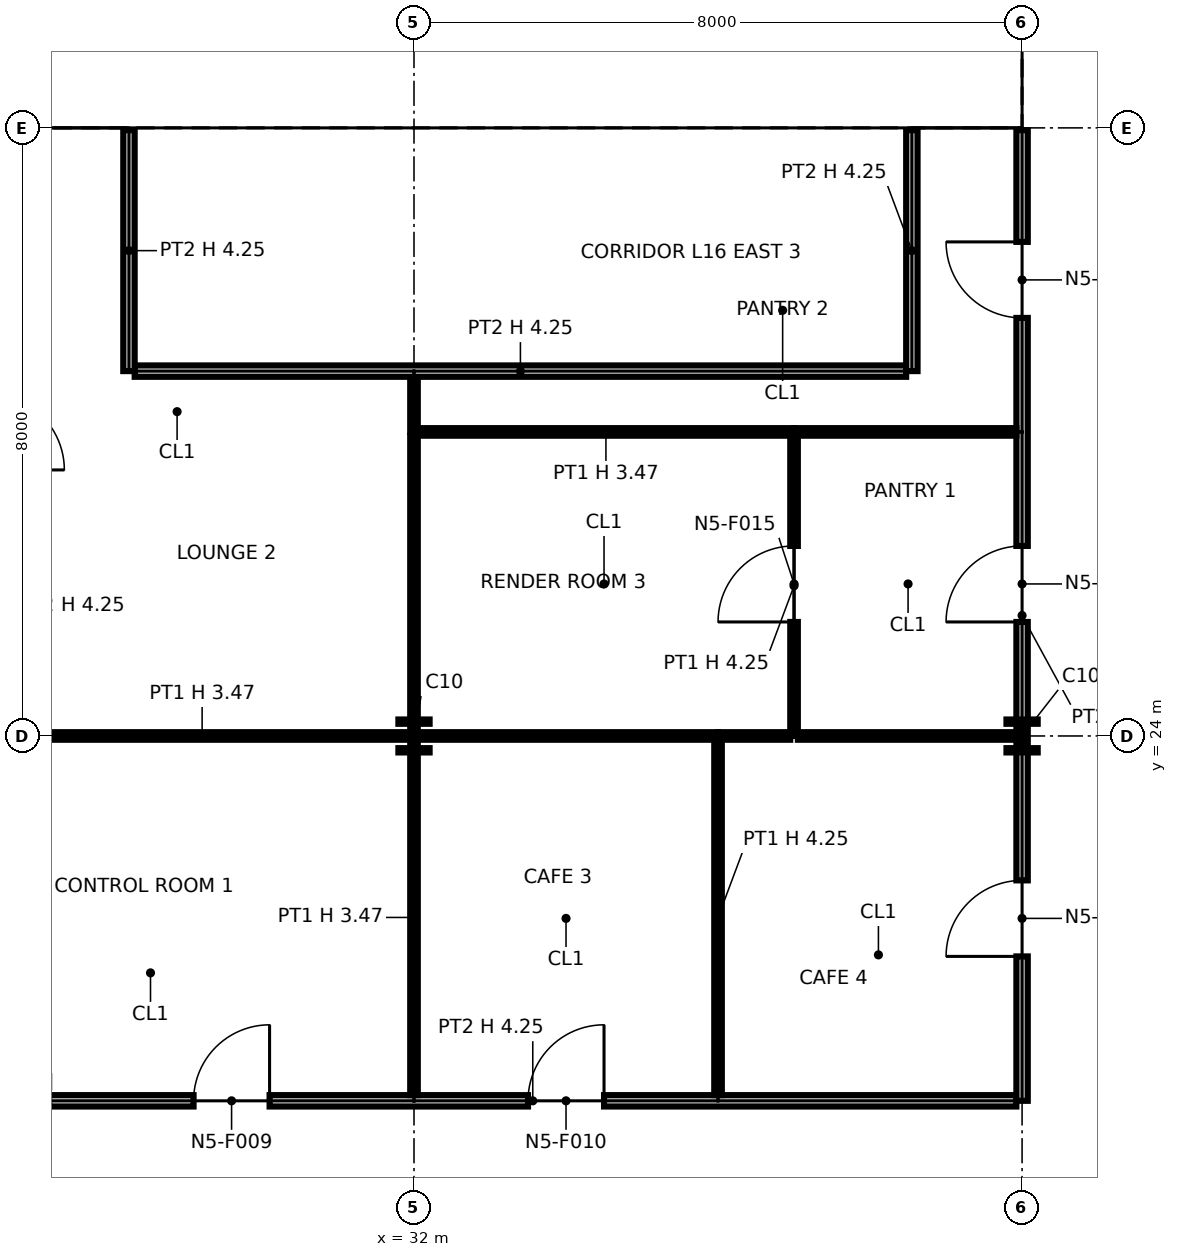
"""IFC4 building model, lengths in metres.
Left out: names, types, materials, properties, quantities, classifications, styles, units other than length and angle.
Written with IfcOpenShell. Run it as: python <this file> out.ifc"""

import sys

from ifc_helpers import new_model, si_unit, direction, frame, frame_2d, origin, origin_2d, place, context, subcontext, project, spatial, polyline, rectangle, i_section, outline, extrude, element, fill, save


model = new_model("IFC4")
c1 = context("Model", 3, precision=1e-05, world=origin(), true_north=direction((0.0, 1.0)))
c2 = subcontext(c1, "Body", "Model", "MODEL_VIEW")
j1 = project(units=[si_unit("LENGTHUNIT", "METRE"), si_unit("PLANEANGLEUNIT", "RADIAN")], contexts=[c1])
p1 = place(None, origin())
s1 = spatial("IfcSite", under=j1, at=p1, CompositionType="ELEMENT")
p2 = place(p1, origin())
s2 = spatial("IfcBuilding", under=s1, at=p2, CompositionType="ELEMENT")
p3 = place(p2, frame((0.0, 0.0, 87.6)))
s3 = spatial("IfcBuildingStorey", under=s2, at=p3, CompositionType="ELEMENT", Elevation=87.6)
p4 = place(p3, frame((32.0, 24.0, 0.0), z_axis=(0.0, 0.0, 1.0), x_axis=(1.0, 0.0, 0.0)))
e1 = element("IfcColumn", 1, at=p4, inside=s3, PredefinedType="COLUMN", context=c2, shape_type="SweptSolid", body=[
    extrude(i_section(OverallWidth=0.411, OverallDepth=0.434, WebThickness=0.036, FlangeThickness=0.057, at=origin_2d()), origin(), (0.0, 0.0, 1.0), 4.25),
])
p5 = place(p3, frame((32.0, 32.0, 0.0), z_axis=(0.0, 0.0, 1.0), x_axis=(1.0, 0.0, 0.0)))
e2 = element("IfcColumn", 2, at=p5, inside=s3, PredefinedType="COLUMN", context=c2, shape_type="SweptSolid", body=[
    extrude(i_section(OverallWidth=0.257, OverallDepth=0.363, WebThickness=0.013, FlangeThickness=0.022, at=origin_2d()), origin(), (0.0, 0.0, 1.0), 4.25),
])
p6 = place(p3, frame((40.0, 24.0, 0.0), z_axis=(0.0, 0.0, 1.0), x_axis=(1.0, 0.0, 0.0)))
e3 = element("IfcColumn", 3, at=p6, inside=s3, PredefinedType="COLUMN", context=c2, shape_type="SweptSolid", body=[
    extrude(i_section(OverallWidth=0.411, OverallDepth=0.434, WebThickness=0.036, FlangeThickness=0.057, at=origin_2d()), origin(), (0.0, 0.0, 1.0), 4.25),
])
p7 = place(p3, frame((40.0, 32.0, 0.0), z_axis=(0.0, 0.0, 1.0), x_axis=(1.0, 0.0, 0.0)))
e4 = element("IfcColumn", 4, at=p7, inside=s3, PredefinedType="COLUMN", context=c2, shape_type="SweptSolid", body=[
    extrude(i_section(OverallWidth=0.257, OverallDepth=0.363, WebThickness=0.013, FlangeThickness=0.022, at=origin_2d()), origin(), (0.0, 0.0, 1.0), 4.25),
])
p8 = place(p3, frame((24.65, 32.75, 0.0), z_axis=(0.0, 0.0, 1.0), x_axis=(1.0, 0.0, 0.0)))
e5 = element("IfcWall", 5, at=p8, inside=s3, PredefinedType="PARTITIONING", context=c2, shape_type="SweptSolid", body=[
    extrude(outline(polyline([(0.0, 0.0), (14.7, 0.0), (14.7, 4.25), (7.469, 4.25), (7.469, 3.632), (7.231, 3.632), (7.23, 4.25), (0.0, 4.25), (0.0, 0.0)])), frame((0.0, 0.1, 0.0), z_axis=(0.0, -1.0, 0.0), x_axis=(1.0, 0.0, 0.0)), (0.0, 0.0, 1.0), 0.2),
])
p9 = place(p8, frame((4.1, 0.0, 0.0)))
e6 = element("IfcOpeningElement", 6, at=p9, cuts=e5, PredefinedType="OPENING", context=c2, shape_type="SweptSolid", body=[
    extrude(rectangle(XDim=1.8, YDim=2.1, at=frame_2d((0.9, 1.05))), frame((0.0, 0.11, 0.0), z_axis=(0.0, -1.0, 0.0), x_axis=(1.0, 0.0, 0.0)), (0.0, 0.0, 1.0), 0.22),
])
p10 = place(p8, frame((8.55, 0.0, 0.0)))
e7 = element("IfcOpeningElement", 7, at=p10, cuts=e5, PredefinedType="OPENING", context=c2, shape_type="SweptSolid", body=[
    extrude(rectangle(XDim=1.4, YDim=2.1, at=frame_2d((0.7, 1.05))), frame((0.0, 0.11, 0.0), z_axis=(0.0, -1.0, 0.0), x_axis=(1.0, 0.0, 0.0)), (0.0, 0.0, 1.0), 0.22),
])
p11 = place(p8, frame((12.0, 0.0, 0.0)))
e8 = element("IfcOpeningElement", 8, at=p11, cuts=e5, PredefinedType="OPENING", context=c2, shape_type="SweptSolid", body=[
    extrude(rectangle(XDim=1.4, YDim=2.1, at=frame_2d((0.7, 1.05))), frame((0.0, 0.11, 0.0), z_axis=(0.0, -1.0, 0.0), x_axis=(1.0, 0.0, 0.0)), (0.0, 0.0, 1.0), 0.22),
])
p12 = place(p3, frame((30.025, 32.85, 0.0), z_axis=(0.0, 0.0, 1.0), x_axis=(0.0, 1.0, 0.0)))
e9 = element("IfcWall", 9, at=p12, inside=s3, PredefinedType="PARTITIONING", context=c2, shape_type="SweptSolid", body=[
    extrude(rectangle(XDim=2.0, YDim=0.15, at=frame_2d((1.0, 0.0))), origin(), (0.0, 0.0, 1.0), 4.25),
])
p13 = place(p12, frame((1.45, 0.0, 0.0), z_axis=(0.0, 0.0, 1.0), x_axis=(-1.0, 0.0, 0.0)))
e10 = element("IfcOpeningElement", 10, at=p13, cuts=e9, PredefinedType="OPENING", context=c2, shape_type="SweptSolid", body=[
    extrude(rectangle(XDim=0.7, YDim=2.1, at=frame_2d((0.35, 1.05))), frame((0.0, 0.085, 0.0), z_axis=(0.0, -1.0, 0.0), x_axis=(1.0, 0.0, 0.0)), (0.0, 0.0, 1.0), 0.17),
])
p14 = place(p3, frame((31.95, 32.85, 0.0), z_axis=(0.0, 0.0, 1.0), x_axis=(0.0, 1.0, 0.0)))
e11 = element("IfcWall", 11, at=p14, inside=s3, PredefinedType="PARTITIONING", context=c2, shape_type="SweptSolid", body=[
    extrude(rectangle(XDim=2.05, YDim=0.7, at=frame_2d((1.025, 0.0))), origin(), (0.0, 0.0, 1.0), 3.632),
])
for number, where, z_axis, x_axis in (
    (12, (35.6, 32.85, 0.0), (0.0, 0.0, 1.0), (0.0, 1.0, 0.0)),
    (13, (39.25, 32.85, 0.0), (0.0, 0.0, 1.0), (0.0, 1.0, 0.0)),
):
    element("IfcWall", number, at=place(p3, frame(where, z_axis=z_axis, x_axis=x_axis)), inside=s3, PredefinedType="PARTITIONING", context=c2, shape_type="SweptSolid", body=[
        extrude(rectangle(XDim=6.3, YDim=0.2, at=frame_2d((3.15, 0.0))), origin(), (0.0, 0.0, 1.0), 4.25),
    ])
p15 = place(p3, frame((27.2, 19.2, 0.0), z_axis=(0.0, 0.0, 1.0), x_axis=(1.0, 0.0, 0.0)))
e14 = element("IfcWall", 14, at=p15, inside=s3, PredefinedType="PARTITIONING", context=c2, shape_type="SweptSolid", body=[
    extrude(rectangle(XDim=12.725, YDim=0.15, at=frame_2d((6.363, 0.0))), origin(), (0.0, 0.0, 1.0), 4.25),
])
p16 = place(p15, frame((1.9, 0.0, 0.0)))
e15 = element("IfcOpeningElement", 15, at=p16, cuts=e14, PredefinedType="OPENING", context=c2, shape_type="SweptSolid", body=[
    extrude(rectangle(XDim=1.0, YDim=2.1, at=frame_2d((0.5, 1.05))), frame((0.0, 0.085, 0.0), z_axis=(0.0, -1.0, 0.0), x_axis=(1.0, 0.0, 0.0)), (0.0, 0.0, 1.0), 0.17),
])
p17 = place(p15, frame((6.3, 0.0, 0.0)))
e16 = element("IfcOpeningElement", 16, at=p17, cuts=e14, PredefinedType="OPENING", context=c2, shape_type="SweptSolid", body=[
    extrude(rectangle(XDim=1.0, YDim=2.1, at=frame_2d((0.5, 1.05))), frame((0.0, 0.085, 0.0), z_axis=(0.0, -1.0, 0.0), x_axis=(1.0, 0.0, 0.0)), (0.0, 0.0, 1.0), 0.17),
])
p18 = place(p3, frame((32.0, 19.275, 0.0), z_axis=(0.0, 0.0, 1.0), x_axis=(0.0, 1.0, 0.0)))
e17 = element("IfcWall", 17, at=p18, inside=s3, PredefinedType="PARTITIONING", context=c2, shape_type="SweptSolid", body=[
    extrude(rectangle(XDim=4.675, YDim=0.1, at=frame_2d((2.337, 0.0))), origin(), (0.0, 0.0, 1.0), 3.47),
])
p19 = place(p3, frame((36.0, 19.275, 0.0), z_axis=(0.0, 0.0, 1.0), x_axis=(0.0, 1.0, 0.0)))
e18 = element("IfcWall", 18, at=p19, inside=s3, PredefinedType="PARTITIONING", context=c2, shape_type="SweptSolid", body=[
    extrude(outline(polyline([(0.0, 0.0), (4.675, 0.0), (4.675, 4.25), (1.025, 4.25), (1.023, 3.47), (0.427, 3.47), (0.425, 4.25), (0.0, 4.25), (0.0, 0.0)])), frame((0.0, 0.05, 0.0), z_axis=(0.0, -1.0, 0.0), x_axis=(1.0, 0.0, 0.0)), (0.0, 0.0, 1.0), 0.1),
])
p20 = place(p3, frame((40.0, 19.2, 0.0), z_axis=(0.0, 0.0, 1.0), x_axis=(0.0, 1.0, 0.0)))
e19 = element("IfcWall", 19, at=p20, inside=s3, PredefinedType="PARTITIONING", context=c2, shape_type="SweptSolid", body=[
    extrude(rectangle(XDim=12.77, YDim=0.15, at=frame_2d((6.385, 0.0))), origin(), (0.0, 0.0, 1.0), 3.47),
])
p21 = place(p20, frame((1.9, 0.0, 0.0)))
e20 = element("IfcOpeningElement", 20, at=p21, cuts=e19, PredefinedType="OPENING", context=c2, shape_type="SweptSolid", body=[
    extrude(rectangle(XDim=1.0, YDim=2.1, at=frame_2d((0.5, 1.05))), frame((0.0, 0.085, 0.0), z_axis=(0.0, -1.0, 0.0), x_axis=(1.0, 0.0, 0.0)), (0.0, 0.0, 1.0), 0.17),
])
p22 = place(p20, frame((6.3, 0.0, 0.0)))
e21 = element("IfcOpeningElement", 21, at=p22, cuts=e19, PredefinedType="OPENING", context=c2, shape_type="SweptSolid", body=[
    extrude(rectangle(XDim=1.0, YDim=2.1, at=frame_2d((0.5, 1.05))), frame((0.0, 0.085, 0.0), z_axis=(0.0, -1.0, 0.0), x_axis=(1.0, 0.0, 0.0)), (0.0, 0.0, 1.0), 0.17),
])
p23 = place(p20, frame((10.3, 0.0, 0.0)))
e22 = element("IfcOpeningElement", 22, at=p23, cuts=e19, PredefinedType="OPENING", context=c2, shape_type="SweptSolid", body=[
    extrude(rectangle(XDim=1.0, YDim=2.1, at=frame_2d((0.5, 1.05))), frame((0.0, 0.085, 0.0), z_axis=(0.0, -1.0, 0.0), x_axis=(1.0, 0.0, 0.0)), (0.0, 0.0, 1.0), 0.17),
])
p24 = place(p3, frame((26.475, 24.0, 0.0), z_axis=(0.0, 0.0, 1.0), x_axis=(1.0, 0.0, 0.0)))
e23 = element("IfcWall", 23, at=p24, inside=s3, PredefinedType="PARTITIONING", context=c2, shape_type="SweptSolid", body=[
    extrude(rectangle(XDim=5.475, YDim=0.1, at=frame_2d((2.737, 0.0))), origin(), (0.0, 0.0, 1.0), 3.47),
])
for number, where, z_axis, x_axis in (
    (24, (32.05, 24.0, 0.0), (0.0, 0.0, 1.0), (1.0, 0.0, 0.0)),
    (25, (32.0, 24.0, 0.0), (0.0, 0.0, 1.0), (0.0, 1.0, 0.0)),
):
    element("IfcWall", number, at=place(p3, frame(where, z_axis=z_axis, x_axis=x_axis)), inside=s3, PredefinedType="PARTITIONING", context=c2, shape_type="SweptSolid", body=[
        extrude(rectangle(XDim=3.95, YDim=0.1, at=frame_2d((1.975, 0.0))), origin(), (0.0, 0.0, 1.0), 3.47),
    ])
p25 = place(p3, frame((36.0, 24.0, 0.0), z_axis=(0.0, 0.0, 1.0), x_axis=(1.0, 0.0, 0.0)))
e26 = element("IfcWall", 26, at=p25, inside=s3, PredefinedType="PARTITIONING", context=c2, shape_type="SweptSolid", body=[
    extrude(rectangle(XDim=0.95, YDim=0.1, at=frame_2d((0.475, 0.0))), origin(), (0.0, 0.0, 1.0), 3.47),
])
p26 = place(p3, frame((37.05, 24.0, 0.0), z_axis=(0.0, 0.0, 1.0), x_axis=(1.0, 0.0, 0.0)))
e27 = element("IfcWall", 27, at=p26, inside=s3, PredefinedType="PARTITIONING", context=c2, shape_type="SweptSolid", body=[
    extrude(rectangle(XDim=2.875, YDim=0.1, at=frame_2d((1.438, 0.0))), origin(), (0.0, 0.0, 1.0), 3.47),
])
p27 = place(p3, frame((37.0, 24.0, 0.0), z_axis=(0.0, 0.0, 1.0), x_axis=(0.0, 1.0, 0.0)))
e28 = element("IfcWall", 28, at=p27, inside=s3, PredefinedType="PARTITIONING", context=c2, shape_type="SweptSolid", body=[
    extrude(rectangle(XDim=3.95, YDim=0.1, at=frame_2d((1.975, 0.0))), origin(), (0.0, 0.0, 1.0), 4.25),
])
p28 = place(p27, frame((1.5, 0.0, 0.0)))
e29 = element("IfcOpeningElement", 29, at=p28, cuts=e28, PredefinedType="OPENING", context=c2, shape_type="SweptSolid", body=[
    extrude(rectangle(XDim=1.0, YDim=2.1, at=frame_2d((0.5, 1.05))), frame((0.0, 0.06, 0.0), z_axis=(0.0, -1.0, 0.0), x_axis=(1.0, 0.0, 0.0)), (0.0, 0.0, 1.0), 0.12),
])
p29 = place(p3, frame((32.05, 28.0, 0.0), z_axis=(0.0, 0.0, 1.0), x_axis=(1.0, 0.0, 0.0)))
e30 = element("IfcWall", 30, at=p29, inside=s3, PredefinedType="PARTITIONING", context=c2, shape_type="SweptSolid", body=[
    extrude(rectangle(XDim=4.95, YDim=0.1, at=frame_2d((2.475, 0.0))), origin(), (0.0, 0.0, 1.0), 3.47),
])
p30 = place(p3, frame((32.0, 28.0, 0.0), z_axis=(0.0, 0.0, 1.0), x_axis=(0.0, 1.0, 0.0)))
e31 = element("IfcWall", 31, at=p30, inside=s3, PredefinedType="PARTITIONING", context=c2, shape_type="SweptSolid", body=[
    extrude(rectangle(XDim=0.725, YDim=0.1, at=frame_2d((0.363, 0.0))), origin(), (0.0, 0.0, 1.0), 3.47),
])
p31 = place(p3, frame((37.0, 28.0, 0.0), z_axis=(0.0, 0.0, 1.0), x_axis=(1.0, 0.0, 0.0)))
e32 = element("IfcWall", 32, at=p31, inside=s3, PredefinedType="PARTITIONING", context=c2, shape_type="SweptSolid", body=[
    extrude(rectangle(XDim=2.925, YDim=0.1, at=frame_2d((1.462, 0.0))), origin(), (0.0, 0.0, 1.0), 3.47),
])
p32 = place(p3, frame((28.325, 28.8, 0.0), z_axis=(0.0, 0.0, 1.0), x_axis=(1.0, 0.0, 0.0)))
e33 = element("IfcWall", 33, at=p32, inside=s3, PredefinedType="PARTITIONING", context=c2, shape_type="SweptSolid", body=[
    extrude(rectangle(XDim=10.15, YDim=0.15, at=frame_2d((5.075, 0.0))), origin(), (0.0, 0.0, 1.0), 4.25),
])
for number, where, z_axis, x_axis in (
    (34, (28.25, 28.8, 0.0), (0.0, 0.0, 1.0), (0.0, 1.0, 0.0)),
    (35, (38.55, 28.8, 0.0), (0.0, 0.0, 1.0), (0.0, 1.0, 0.0)),
):
    element("IfcWall", number, at=place(p3, frame(where, z_axis=z_axis, x_axis=x_axis)), inside=s3, PredefinedType="PARTITIONING", context=c2, shape_type="SweptSolid", body=[
        extrude(rectangle(XDim=3.17, YDim=0.15, at=frame_2d((1.585, 0.0))), origin(), (0.0, 0.0, 1.0), 4.25),
    ])
p33 = place(p9, origin())
e36 = element("IfcDoor", 36, at=p33, inside=s3, OperationType="DOUBLE_DOOR_SINGLE_SWING", PredefinedType="NOTDEFINED", context=c2, shape_type="SweptSolid", body=[
    extrude(rectangle(XDim=1.8, YDim=2.1, at=frame_2d((0.9, 1.05))), frame((0.0, 0.025, 0.0), z_axis=(0.0, -1.0, 0.0), x_axis=(1.0, 0.0, 0.0)), (0.0, 0.0, 1.0), 0.05),
])
fill(e6, e36)
p34 = place(p10, origin())
e37 = element("IfcDoor", 37, at=p34, inside=s3, OperationType="DOUBLE_DOOR_SINGLE_SWING", PredefinedType="NOTDEFINED", context=c2, shape_type="SweptSolid", body=[
    extrude(rectangle(XDim=1.4, YDim=2.1, at=frame_2d((0.7, 1.05))), frame((0.0, 0.025, 0.0), z_axis=(0.0, -1.0, 0.0), x_axis=(1.0, 0.0, 0.0)), (0.0, 0.0, 1.0), 0.05),
])
fill(e7, e37)
p35 = place(p11, origin())
e38 = element("IfcDoor", 38, at=p35, inside=s3, OperationType="DOUBLE_DOOR_SINGLE_SWING", PredefinedType="NOTDEFINED", context=c2, shape_type="SweptSolid", body=[
    extrude(rectangle(XDim=1.4, YDim=2.1, at=frame_2d((0.7, 1.05))), frame((0.0, 0.025, 0.0), z_axis=(0.0, -1.0, 0.0), x_axis=(1.0, 0.0, 0.0)), (0.0, 0.0, 1.0), 0.05),
])
fill(e8, e38)
p36 = place(p16, origin())
e39 = element("IfcDoor", 39, at=p36, inside=s3, OperationType="SINGLE_SWING_RIGHT", PredefinedType="DOOR", context=c2, shape_type="SweptSolid", body=[
    extrude(rectangle(XDim=1.0, YDim=2.1, at=frame_2d((0.5, 1.05))), frame((0.0, 0.025, 0.0), z_axis=(0.0, -1.0, 0.0), x_axis=(1.0, 0.0, 0.0)), (0.0, 0.0, 1.0), 0.05),
])
fill(e15, e39)
p37 = place(p17, origin())
e40 = element("IfcDoor", 40, at=p37, inside=s3, OperationType="SINGLE_SWING_RIGHT", PredefinedType="DOOR", context=c2, shape_type="SweptSolid", body=[
    extrude(rectangle(XDim=1.0, YDim=2.1, at=frame_2d((0.5, 1.05))), frame((0.0, 0.025, 0.0), z_axis=(0.0, -1.0, 0.0), x_axis=(1.0, 0.0, 0.0)), (0.0, 0.0, 1.0), 0.05),
])
fill(e16, e40)
p38 = place(p21, origin())
e41 = element("IfcDoor", 41, at=p38, inside=s3, OperationType="SINGLE_SWING_LEFT", PredefinedType="DOOR", context=c2, shape_type="SweptSolid", body=[
    extrude(rectangle(XDim=1.0, YDim=2.1, at=frame_2d((0.5, 1.05))), frame((0.0, 0.025, 0.0), z_axis=(0.0, -1.0, 0.0), x_axis=(1.0, 0.0, 0.0)), (0.0, 0.0, 1.0), 0.05),
])
fill(e20, e41)
p39 = place(p22, origin())
e42 = element("IfcDoor", 42, at=p39, inside=s3, OperationType="SINGLE_SWING_LEFT", PredefinedType="DOOR", context=c2, shape_type="SweptSolid", body=[
    extrude(rectangle(XDim=1.0, YDim=2.1, at=frame_2d((0.5, 1.05))), frame((0.0, 0.025, 0.0), z_axis=(0.0, -1.0, 0.0), x_axis=(1.0, 0.0, 0.0)), (0.0, 0.0, 1.0), 0.05),
])
fill(e21, e42)
p40 = place(p28, origin())
e43 = element("IfcDoor", 43, at=p40, inside=s3, OperationType="SINGLE_SWING_LEFT", PredefinedType="DOOR", context=c2, shape_type="SweptSolid", body=[
    extrude(rectangle(XDim=1.0, YDim=2.1, at=frame_2d((0.5, 1.05))), frame((0.0, 0.025, 0.0), z_axis=(0.0, -1.0, 0.0), x_axis=(1.0, 0.0, 0.0)), (0.0, 0.0, 1.0), 0.05),
])
fill(e29, e43)
p41 = place(p23, origin())
e44 = element("IfcDoor", 44, at=p41, inside=s3, OperationType="SINGLE_SWING_RIGHT", PredefinedType="DOOR", context=c2, shape_type="SweptSolid", body=[
    extrude(rectangle(XDim=1.0, YDim=2.1, at=frame_2d((0.5, 1.05))), frame((0.0, 0.025, 0.0), z_axis=(0.0, -1.0, 0.0), x_axis=(1.0, 0.0, 0.0)), (0.0, 0.0, 1.0), 0.05),
])
fill(e22, e44)
save(model, sys.argv[1])
